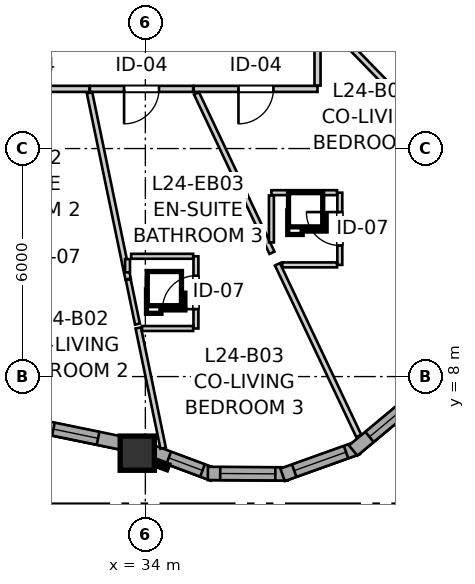
"""IFC4 building model, lengths in metres.
Left out: names, types, materials, properties, quantities, classifications, styles, units other than length and angle.
Written with IfcOpenShell. Run it as: python <this file> out.ifc"""

import sys

from ifc_helpers import new_model, si_unit, direction, frame, frame_2d, origin, origin_2d, place, context, subcontext, project, spatial, rectangle, extrude, source, transform, mapped, element, fill, save


model = new_model("IFC4")
c1 = context("Model", 3, precision=1e-05, world=origin(), true_north=direction((0.0, 1.0)))
c2 = subcontext(c1, "Body", "Model", "MODEL_VIEW")
j1 = project(units=[si_unit("LENGTHUNIT", "METRE"), si_unit("PLANEANGLEUNIT", "RADIAN")], contexts=[c1])
p1 = place(None, origin())
s1 = spatial("IfcSite", under=j1, at=p1, CompositionType="ELEMENT")
p2 = place(p1, origin())
s2 = spatial("IfcBuilding", under=s1, at=p2, CompositionType="ELEMENT")
p3 = place(p2, frame((0.0, 0.0, 83.2)))
s3 = spatial("IfcBuildingStorey", under=s2, at=p3, CompositionType="ELEMENT", Elevation=83.2)
m1 = source(origin(), c2, "Body", "SweptSolid", [
    extrude(rectangle(XDim=0.9, YDim=0.9, at=origin_2d()), origin(), (0.0, 0.0, 1.0), 2.935),
])
p4 = place(p3, frame((33.787, 5.985, 0.0), z_axis=(0.0, 0.0, 1.0), x_axis=(1.0, 0.0, 0.0)))
e1 = element("IfcColumn", 1, at=p4, inside=s3, PredefinedType="COLUMN", context=c2, shape_type="MappedRepresentation", body=[
    mapped(m1, transform((0.0, 0.0, 0.0), x_axis=(1.0, 0.0, 0.0), y_axis=(0.0, 1.0, 0.0), z_axis=(0.0, 0.0, 1.0), scale=1.0)),
])
p5 = place(p3, frame((30.724, 6.794, 0.0), z_axis=(0.0, 0.0, 1.0), x_axis=(0.979439663571, -0.201737317878, 0.0)))
e2 = element("IfcWall", 2, at=p5, inside=s3, PredefinedType="SOLIDWALL", context=c2, shape_type="SweptSolid", body=[
    extrude(rectangle(XDim=2.938, YDim=0.35, at=frame_2d((1.469, 0.0))), origin(), (0.0, 0.0, 1.0), 2.465),
])
p6 = place(p5, frame((0.874, 0.0, 0.82)))
e3 = element("IfcOpeningElement", 3, at=p6, cuts=e2, PredefinedType="OPENING", context=c2, shape_type="SweptSolid", body=[
    extrude(rectangle(XDim=1.2, YDim=1.45, at=frame_2d((0.6, 0.725))), frame((0.0, 0.185, 0.0), z_axis=(0.0, -1.0, 0.0), x_axis=(1.0, 0.0, 0.0)), (0.0, 0.0, 1.0), 0.37),
])
p7 = place(p3, frame((34.059, 6.07, 0.0), z_axis=(0.0, 0.0, 1.0), x_axis=(0.936803747811, -0.349855310219, 0.0)))
e4 = element("IfcWall", 4, at=p7, inside=s3, PredefinedType="SOLIDWALL", context=c2, shape_type="SweptSolid", body=[
    extrude(rectangle(XDim=1.836, YDim=0.35, at=frame_2d((0.918, 0.0))), origin(), (0.0, 0.0, 1.0), 2.465),
])
p8 = place(p7, frame((0.593, 0.0, 0.82)))
e5 = element("IfcOpeningElement", 5, at=p8, cuts=e4, PredefinedType="OPENING", context=c2, shape_type="SweptSolid", body=[
    extrude(rectangle(XDim=0.95, YDim=1.35, at=frame_2d((0.475, 0.675))), frame((0.0, 0.185, 0.0), z_axis=(0.0, -1.0, 0.0), x_axis=(1.0, 0.0, 0.0)), (0.0, 0.0, 1.0), 0.37),
])
p9 = place(p3, frame((35.646, 5.452, 0.0), z_axis=(0.0, 0.0, 1.0), x_axis=(0.999976451414, -0.006862697526, 0.0)))
e6 = element("IfcWall", 6, at=p9, inside=s3, PredefinedType="SOLIDWALL", context=c2, shape_type="SweptSolid", body=[
    extrude(rectangle(XDim=2.099, YDim=0.35, at=frame_2d((1.049, 0.0))), origin(), (0.0, 0.0, 1.0), 2.465),
])
p10 = place(p9, frame((0.324, 0.0, 0.82)))
e7 = element("IfcOpeningElement", 7, at=p10, cuts=e6, PredefinedType="OPENING", context=c2, shape_type="SweptSolid", body=[
    extrude(rectangle(XDim=1.45, YDim=1.25, at=frame_2d((0.725, 0.625))), frame((0.0, 0.185, 0.0), z_axis=(0.0, -1.0, 0.0), x_axis=(1.0, 0.0, 0.0)), (0.0, 0.0, 1.0), 0.37),
])
p11 = place(p3, frame((37.61, 5.415, 0.0), z_axis=(0.0, 0.0, 1.0), x_axis=(0.941473186867, 0.33708787936, 0.0)))
e8 = element("IfcWall", 8, at=p11, inside=s3, PredefinedType="SOLIDWALL", context=c2, shape_type="SweptSolid", body=[
    extrude(rectangle(XDim=2.099, YDim=0.35, at=frame_2d((1.049, 0.0))), origin(), (0.0, 0.0, 1.0), 2.465),
])
p12 = place(p11, frame((0.324, 0.0, 0.82)))
e9 = element("IfcOpeningElement", 9, at=p12, cuts=e8, PredefinedType="OPENING", context=c2, shape_type="SweptSolid", body=[
    extrude(rectangle(XDim=1.45, YDim=1.25, at=frame_2d((0.725, 0.625))), frame((0.0, 0.185, 0.0), z_axis=(0.0, -1.0, 0.0), x_axis=(1.0, 0.0, 0.0)), (0.0, 0.0, 1.0), 0.37),
])
p13 = place(p3, frame((39.469, 6.055, 0.0), z_axis=(0.0, 0.0, 1.0), x_axis=(0.768497696041, 0.639852554249, 0.0)))
e10 = element("IfcWall", 10, at=p13, inside=s3, PredefinedType="SOLIDWALL", context=c2, shape_type="SweptSolid", body=[
    extrude(rectangle(XDim=2.099, YDim=0.35, at=frame_2d((1.049, 0.0))), origin(), (0.0, 0.0, 1.0), 2.465),
])
p14 = place(p13, frame((0.559, 0.0, 0.82)))
e11 = element("IfcOpeningElement", 11, at=p14, cuts=e10, PredefinedType="OPENING", context=c2, shape_type="SweptSolid", body=[
    extrude(rectangle(XDim=1.25, YDim=1.35, at=frame_2d((0.625, 0.675))), frame((0.0, 0.185, 0.0), z_axis=(0.0, -1.0, 0.0), x_axis=(1.0, 0.0, 0.0)), (0.0, 0.0, 1.0), 0.37),
])
p15 = place(p3, frame((38.53, 15.57, 0.0), z_axis=(0.0, 0.0, 1.0), x_axis=(-1.0, 0.0, 0.0)))
e12 = element("IfcWall", 12, at=p15, inside=s3, PredefinedType="PARTITIONING", context=c2, shape_type="SweptSolid", body=[
    extrude(rectangle(XDim=3.257, YDim=0.16, at=frame_2d((1.628, 0.0))), origin(), (0.0, 0.0, 1.0), 2.935),
])
p16 = place(p15, frame((1.16, 0.0, 0.0)))
e13 = element("IfcOpeningElement", 13, at=p16, cuts=e12, PredefinedType="OPENING", context=c2, shape_type="SweptSolid", body=[
    extrude(rectangle(XDim=0.92, YDim=2.1, at=frame_2d((0.46, 1.05))), frame((0.0, 0.09, 0.0), z_axis=(0.0, -1.0, 0.0), x_axis=(1.0, 0.0, 0.0)), (0.0, 0.0, 1.0), 0.18),
])
p17 = place(p3, frame((32.525, 15.57, 0.0), z_axis=(0.0, 0.0, 1.0), x_axis=(-1.0, 0.0, 0.0)))
e14 = element("IfcWall", 14, at=p17, inside=s3, PredefinedType="PARTITIONING", context=c2, shape_type="SweptSolid", body=[
    extrude(rectangle(XDim=3.072, YDim=0.16, at=frame_2d((1.536, 0.0))), origin(), (0.0, 0.0, 1.0), 2.935),
])
p18 = place(p17, frame((1.098, 0.0, 0.0)))
e15 = element("IfcOpeningElement", 15, at=p18, cuts=e14, PredefinedType="OPENING", context=c2, shape_type="SweptSolid", body=[
    extrude(rectangle(XDim=0.92, YDim=2.1, at=frame_2d((0.46, 1.05))), frame((0.0, 0.09, 0.0), z_axis=(0.0, -1.0, 0.0), x_axis=(1.0, 0.0, 0.0)), (0.0, 0.0, 1.0), 0.18),
])
p19 = place(p3, frame((35.258, 15.57, 0.0), z_axis=(0.0, 0.0, 1.0), x_axis=(-1.0, 0.0, 0.0)))
e16 = element("IfcWall", 16, at=p19, inside=s3, PredefinedType="PARTITIONING", context=c2, shape_type="SweptSolid", body=[
    extrude(rectangle(XDim=2.718, YDim=0.16, at=frame_2d((1.359, 0.0))), origin(), (0.0, 0.0, 1.0), 2.935),
])
p20 = place(p19, frame((0.898, 0.0, 0.0)))
e17 = element("IfcOpeningElement", 17, at=p20, cuts=e16, PredefinedType="OPENING", context=c2, shape_type="SweptSolid", body=[
    extrude(rectangle(XDim=0.92, YDim=2.1, at=frame_2d((0.46, 1.05))), frame((0.0, 0.09, 0.0), z_axis=(0.0, -1.0, 0.0), x_axis=(1.0, 0.0, 0.0)), (0.0, 0.0, 1.0), 0.18),
])
p21 = place(p3, frame((39.117, 10.939, 0.0), z_axis=(0.0, 0.0, 1.0), x_axis=(0.0, 1.0, 0.0)))
e18 = element("IfcWall", 18, at=p21, inside=s3, PredefinedType="PARTITIONING", context=c2, shape_type="SweptSolid", body=[
    extrude(rectangle(XDim=1.9, YDim=0.13, at=frame_2d((0.95, 0.0))), origin(), (0.0, 0.0, 1.0), 2.935),
])
p22 = place(p21, frame((0.51, 0.0, 0.0)))
e19 = element("IfcOpeningElement", 19, at=p22, cuts=e18, PredefinedType="OPENING", context=c2, shape_type="SweptSolid", body=[
    extrude(rectangle(XDim=0.88, YDim=2.05, at=frame_2d((0.44, 1.025))), frame((0.0, 0.075, 0.0), z_axis=(0.0, -1.0, 0.0), x_axis=(1.0, 0.0, 0.0)), (0.0, 0.0, 1.0), 0.15),
])
p23 = place(p3, frame((35.331, 9.265, 0.0), z_axis=(0.0, 0.0, 1.0), x_axis=(0.0, 1.0, 0.0)))
e20 = element("IfcWall", 20, at=p23, inside=s3, PredefinedType="PARTITIONING", context=c2, shape_type="SweptSolid", body=[
    extrude(rectangle(XDim=1.9, YDim=0.13, at=frame_2d((0.95, 0.0))), origin(), (0.0, 0.0, 1.0), 2.935),
])
p24 = place(p23, frame((0.51, 0.0, 0.0)))
e21 = element("IfcOpeningElement", 21, at=p24, cuts=e20, PredefinedType="OPENING", context=c2, shape_type="SweptSolid", body=[
    extrude(rectangle(XDim=0.88, YDim=2.05, at=frame_2d((0.44, 1.025))), frame((0.0, 0.075, 0.0), z_axis=(0.0, -1.0, 0.0), x_axis=(1.0, 0.0, 0.0)), (0.0, 0.0, 1.0), 0.15),
])
p25 = place(p3, frame((38.667, 17.429, 0.0), z_axis=(0.0, 0.0, 1.0), x_axis=(0.696417222112, -0.717637131666, 0.0)))
e22 = element("IfcWall", 22, at=p25, inside=s3, PredefinedType="PARTITIONING", context=c2, shape_type="SweptSolid", body=[
    extrude(rectangle(XDim=6.04, YDim=0.145, at=frame_2d((3.02, 0.0))), origin(), (0.0, 0.0, 1.0), 2.935),
])
p26 = place(p3, frame((32.531, 15.468, 0.0), z_axis=(0.0, 0.0, 1.0), x_axis=(0.202792769077, -0.979221677053, 0.0)))
e23 = element("IfcWall", 23, at=p26, inside=s3, PredefinedType="PARTITIONING", context=c2, shape_type="SweptSolid", body=[
    extrude(rectangle(XDim=5.003, YDim=0.145, at=frame_2d((2.502, 0.0))), origin(), (0.0, 0.0, 1.0), 2.935),
])
p27 = place(p3, frame((37.476, 10.954, 0.0), z_axis=(0.0, 0.0, 1.0), x_axis=(0.428094746621, -0.903733859007, 0.0)))
e24 = element("IfcWall", 24, at=p27, inside=s3, PredefinedType="PARTITIONING", context=c2, shape_type="SweptSolid", body=[
    extrude(rectangle(XDim=4.996, YDim=0.145, at=frame_2d((2.498, 0.0))), origin(), (0.0, 0.0, 1.0), 2.935),
])
p28 = place(p3, frame((35.346, 15.452, 0.0), z_axis=(0.0, 0.0, 1.0), x_axis=(0.428023015228, -0.903767834366, 0.0)))
e25 = element("IfcWall", 25, at=p28, inside=s3, PredefinedType="PARTITIONING", context=c2, shape_type="SweptSolid", body=[
    extrude(rectangle(XDim=4.64, YDim=0.145, at=frame_2d((2.32, 0.0))), origin(), (0.0, 0.0, 1.0), 2.935),
])
p29 = place(p3, frame((33.813, 9.28, 0.0), z_axis=(0.0, 0.0, 1.0), x_axis=(0.202648062782, -0.979251633979, 0.0)))
e26 = element("IfcWall", 26, at=p29, inside=s3, PredefinedType="PARTITIONING", context=c2, shape_type="SweptSolid", body=[
    extrude(rectangle(XDim=3.232, YDim=0.145, at=frame_2d((1.616, 0.0))), origin(), (0.0, 0.0, 1.0), 2.935),
])
p30 = place(p3, frame((38.53, 15.658, 0.0), z_axis=(0.0, 0.0, 1.0), x_axis=(0.0, 1.0, 0.0)))
e27 = element("IfcWall", 27, at=p30, inside=s3, PredefinedType="PARTITIONING", context=c2, shape_type="SweptSolid", body=[
    extrude(rectangle(XDim=1.682, YDim=0.16, at=frame_2d((0.841, 0.0))), origin(), (0.0, 0.0, 1.0), 2.935),
])
p31 = place(p3, frame((33.626, 11.165, 0.0), z_axis=(0.0, 0.0, 1.0), x_axis=(1.0, 0.0, 0.0)))
e28 = element("IfcWall", 28, at=p31, inside=s3, PredefinedType="PARTITIONING", context=c2, shape_type="SweptSolid", body=[
    extrude(rectangle(XDim=1.632, YDim=0.13, at=frame_2d((0.816, 0.0))), origin(), (0.0, 0.0, 1.0), 2.935),
])
p32 = place(p3, frame((37.317, 12.839, 0.0), z_axis=(0.0, 0.0, 1.0), x_axis=(1.0, 0.0, 0.0)))
e29 = element("IfcWall", 29, at=p32, inside=s3, PredefinedType="PARTITIONING", context=c2, shape_type="SweptSolid", body=[
    extrude(rectangle(XDim=1.727, YDim=0.13, at=frame_2d((0.864, 0.0))), origin(), (0.0, 0.0, 1.0), 2.935),
])
p33 = place(p3, frame((37.602, 10.939, 0.0), z_axis=(0.0, 0.0, 1.0), x_axis=(1.0, 0.0, 0.0)))
e30 = element("IfcWall", 30, at=p33, inside=s3, PredefinedType="PARTITIONING", context=c2, shape_type="SweptSolid", body=[
    extrude(rectangle(XDim=1.442, YDim=0.13, at=frame_2d((0.721, 0.0))), origin(), (0.0, 0.0, 1.0), 2.935),
])
p34 = place(p3, frame((37.317, 11.53, 0.0), z_axis=(0.0, 0.0, 1.0), x_axis=(0.0, 1.0, 0.0)))
e31 = element("IfcWall", 31, at=p34, inside=s3, PredefinedType="PARTITIONING", context=c2, shape_type="SweptSolid", body=[
    extrude(rectangle(XDim=1.236, YDim=0.13, at=frame_2d((0.618, 0.0))), origin(), (0.0, 0.0, 1.0), 2.935),
])
p35 = place(p3, frame((33.912, 9.265, 0.0), z_axis=(0.0, 0.0, 1.0), x_axis=(1.0, 0.0, 0.0)))
e32 = element("IfcWall", 32, at=p35, inside=s3, PredefinedType="PARTITIONING", context=c2, shape_type="SweptSolid", body=[
    extrude(rectangle(XDim=1.346, YDim=0.13, at=frame_2d((0.673, 0.0))), origin(), (0.0, 0.0, 1.0), 2.935),
])
p36 = place(p3, frame((33.549, 10.553, 0.0), z_axis=(0.0, 0.0, 1.0), x_axis=(0.202855035592, -0.97920877985, 0.0)))
e33 = element("IfcWall", 33, at=p36, inside=s3, PredefinedType="PARTITIONING", context=c2, shape_type="SweptSolid", body=[
    extrude(rectangle(XDim=1.198, YDim=0.13, at=frame_2d((0.599, 0.0))), origin(), (0.0, 0.0, 1.0), 2.935),
])
p37 = place(p3, frame((33.531, 10.742, 0.0), z_axis=(0.0, 0.0, 1.0), x_axis=(0.0, 1.0, 0.0)))
e34 = element("IfcWall", 34, at=p37, inside=s3, PredefinedType="PARTITIONING", context=c2, shape_type="SweptSolid", body=[
    extrude(rectangle(XDim=0.35, YDim=0.13, at=frame_2d((0.175, 0.0))), origin(), (0.0, 0.0, 1.0), 2.935),
])
m2 = source(origin(), c2, "Body", "SweptSolid", [
    extrude(rectangle(XDim=1.2, YDim=1.45, at=frame_2d((0.6, 0.725))), frame((0.0, 0.03, 0.0), z_axis=(0.0, -1.0, 0.0), x_axis=(1.0, 0.0, 0.0)), (0.0, 0.0, 1.0), 0.06),
])
p38 = place(p6, origin())
e35 = element("IfcWindow", 35, at=p38, inside=s3, PartitioningType="SINGLE_PANEL", PredefinedType="WINDOW", context=c2, shape_type="MappedRepresentation", body=[
    mapped(m2, transform((0.0, 0.0, 0.0), x_axis=(1.0, 0.0, 0.0), y_axis=(0.0, 1.0, 0.0), z_axis=(0.0, 0.0, 1.0), scale=1.0)),
])
fill(e3, e35)
m3 = source(origin(), c2, "Body", "SweptSolid", [
    extrude(rectangle(XDim=0.95, YDim=1.35, at=frame_2d((0.475, 0.675))), frame((0.0, 0.03, 0.0), z_axis=(0.0, -1.0, 0.0), x_axis=(1.0, 0.0, 0.0)), (0.0, 0.0, 1.0), 0.06),
])
p39 = place(p8, origin())
e36 = element("IfcWindow", 36, at=p39, inside=s3, PartitioningType="SINGLE_PANEL", PredefinedType="WINDOW", context=c2, shape_type="MappedRepresentation", body=[
    mapped(m3, transform((0.0, 0.0, 0.0), x_axis=(1.0, 0.0, 0.0), y_axis=(0.0, 1.0, 0.0), z_axis=(0.0, 0.0, 1.0), scale=1.0)),
])
fill(e5, e36)
m4 = source(origin(), c2, "Body", "SweptSolid", [
    extrude(rectangle(XDim=1.45, YDim=1.25, at=frame_2d((0.725, 0.625))), frame((0.0, 0.03, 0.0), z_axis=(0.0, -1.0, 0.0), x_axis=(1.0, 0.0, 0.0)), (0.0, 0.0, 1.0), 0.06),
])
p40 = place(p10, origin())
e37 = element("IfcWindow", 37, at=p40, inside=s3, PartitioningType="SINGLE_PANEL", PredefinedType="WINDOW", context=c2, shape_type="MappedRepresentation", body=[
    mapped(m4, transform((0.0, 0.0, 0.0), x_axis=(1.0, 0.0, 0.0), y_axis=(0.0, 1.0, 0.0), z_axis=(0.0, 0.0, 1.0), scale=1.0)),
])
fill(e7, e37)
p41 = place(p12, origin())
e38 = element("IfcWindow", 38, at=p41, inside=s3, PartitioningType="SINGLE_PANEL", PredefinedType="WINDOW", context=c2, shape_type="MappedRepresentation", body=[
    mapped(m4, transform((0.0, 0.0, 0.0), x_axis=(1.0, 0.0, 0.0), y_axis=(0.0, 1.0, 0.0), z_axis=(0.0, 0.0, 1.0), scale=1.0)),
])
fill(e9, e38)
m5 = source(origin(), c2, "Body", "SweptSolid", [
    extrude(rectangle(XDim=1.25, YDim=1.35, at=frame_2d((0.625, 0.675))), frame((0.0, 0.03, 0.0), z_axis=(0.0, -1.0, 0.0), x_axis=(1.0, 0.0, 0.0)), (0.0, 0.0, 1.0), 0.06),
])
p42 = place(p14, origin())
e39 = element("IfcWindow", 39, at=p42, inside=s3, PartitioningType="SINGLE_PANEL", PredefinedType="WINDOW", context=c2, shape_type="MappedRepresentation", body=[
    mapped(m5, transform((0.0, 0.0, 0.0), x_axis=(1.0, 0.0, 0.0), y_axis=(0.0, 1.0, 0.0), z_axis=(0.0, 0.0, 1.0), scale=1.0)),
])
fill(e11, e39)
m6 = source(origin(), c2, "Body", "SweptSolid", [
    extrude(rectangle(XDim=0.92, YDim=2.1, at=frame_2d((0.46, 1.05))), frame((0.0, 0.025, 0.0), z_axis=(0.0, -1.0, 0.0), x_axis=(1.0, 0.0, 0.0)), (0.0, 0.0, 1.0), 0.05),
])
p43 = place(p16, origin())
e40 = element("IfcDoor", 40, at=p43, inside=s3, OperationType="SINGLE_SWING_RIGHT", PredefinedType="DOOR", context=c2, shape_type="MappedRepresentation", body=[
    mapped(m6, transform((0.0, 0.0, 0.0), x_axis=(1.0, 0.0, 0.0), y_axis=(0.0, 1.0, 0.0), z_axis=(0.0, 0.0, 1.0), scale=1.0)),
])
fill(e13, e40)
p44 = place(p20, origin())
e41 = element("IfcDoor", 41, at=p44, inside=s3, OperationType="SINGLE_SWING_RIGHT", PredefinedType="DOOR", context=c2, shape_type="MappedRepresentation", body=[
    mapped(m6, transform((0.0, 0.0, 0.0), x_axis=(1.0, 0.0, 0.0), y_axis=(0.0, 1.0, 0.0), z_axis=(0.0, 0.0, 1.0), scale=1.0)),
])
fill(e17, e41)
m7 = source(origin(), c2, "Body", "SweptSolid", [
    extrude(rectangle(XDim=0.88, YDim=2.05, at=frame_2d((0.44, 1.025))), frame((0.0, 0.025, 0.0), z_axis=(0.0, -1.0, 0.0), x_axis=(1.0, 0.0, 0.0)), (0.0, 0.0, 1.0), 0.05),
])
p45 = place(p22, origin())
e42 = element("IfcDoor", 42, at=p45, inside=s3, OperationType="SINGLE_SWING_RIGHT", PredefinedType="DOOR", context=c2, shape_type="MappedRepresentation", body=[
    mapped(m7, transform((0.0, 0.0, 0.0), x_axis=(1.0, 0.0, 0.0), y_axis=(0.0, 1.0, 0.0), z_axis=(0.0, 0.0, 1.0), scale=1.0)),
])
fill(e19, e42)
p46 = place(p24, origin())
e43 = element("IfcDoor", 43, at=p46, inside=s3, OperationType="SINGLE_SWING_LEFT", PredefinedType="DOOR", context=c2, shape_type="MappedRepresentation", body=[
    mapped(m7, transform((0.0, 0.0, 0.0), x_axis=(1.0, 0.0, 0.0), y_axis=(0.0, 1.0, 0.0), z_axis=(0.0, 0.0, 1.0), scale=1.0)),
])
fill(e21, e43)
save(model, sys.argv[1])
